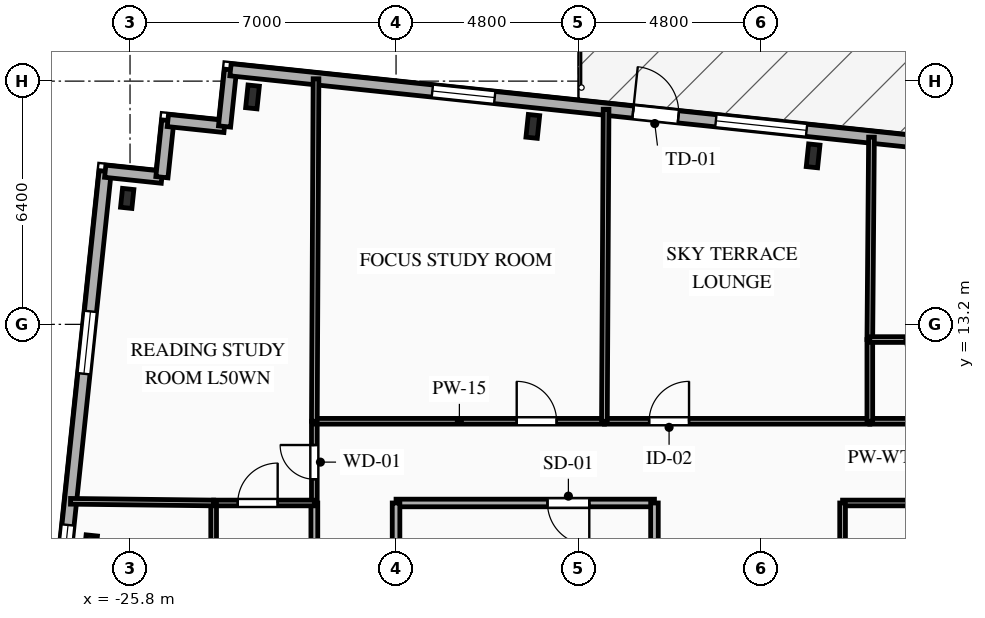
"""IFC4 building model, lengths in metres.
Left out: names, types, materials, properties, quantities, classifications, styles, units other than length and angle.
Written with IfcOpenShell. Run it as: python <this file> out.ifc"""

import sys

from ifc_helpers import new_model, si_unit, direction, frame, frame_2d, origin, origin_2d, place, context, subcontext, project, spatial, rectangle, i_section, extrude, element, fill, save


model = new_model("IFC4")
c1 = context("Model", 3, precision=1e-05, world=origin(), true_north=direction((0.0, 1.0)))
c2 = subcontext(c1, "Body", "Model", "MODEL_VIEW")
j1 = project(units=[si_unit("LENGTHUNIT", "METRE"), si_unit("PLANEANGLEUNIT", "RADIAN")], contexts=[c1])
p1 = place(None, origin())
s1 = spatial("IfcSite", under=j1, at=p1, CompositionType="ELEMENT")
p2 = place(p1, origin())
s2 = spatial("IfcBuilding", under=s1, at=p2, CompositionType="ELEMENT")
p3 = place(p2, frame((0.0, 0.0, 179.65)))
s3 = spatial("IfcBuildingStorey", under=s2, at=p3, CompositionType="ELEMENT", Elevation=179.65)
for number, where, z_axis, x_axis in (
    (1, (-7.825, 17.634, 0.0), (0.0, 0.0, 1.0), (0.995, -0.105, 0.0)),
    (2, (-15.201, 18.409, 0.0), (0.0, 0.0, 1.0), (0.995, -0.105, 0.0)),
    (3, (-22.577, 19.184, 0.0), (0.0, 0.0, 1.0), (0.995, -0.105, 0.0)),
):
    element("IfcColumn", number, at=place(p3, frame(where, z_axis=z_axis, x_axis=x_axis)), inside=s3, PredefinedType="COLUMN", context=c2, shape_type="SweptSolid", body=[
        extrude(i_section(OverallWidth=0.3, OverallDepth=0.6, WebThickness=0.015, FlangeThickness=0.03, FilletRadius=0.027, at=origin_2d()), origin(), (0.0, 0.0, 1.0), 3.35),
    ])
for number, where, z_axis, x_axis in (
    (4, (-25.875, 16.514, 0.0), (0.0, 0.0, 1.0), (0.995, -0.105, 0.0)),
    (5, (-26.833, 7.398, 0.0), (0.0, 0.0, 1.0), (0.995, -0.105, 0.0)),
):
    element("IfcColumn", number, at=place(p3, frame(where, z_axis=z_axis, x_axis=x_axis)), inside=s3, PredefinedType="COLUMN", context=c2, shape_type="SweptSolid", body=[
        extrude(i_section(OverallWidth=0.3, OverallDepth=0.5, WebThickness=0.014, FlangeThickness=0.028, FilletRadius=0.027, at=origin_2d()), origin(), (0.0, 0.0, 1.0), 3.35),
    ])
p4 = place(p3, frame((-29.463, -11.414, 0.0), z_axis=(0.0, 0.0, 1.0), x_axis=(0.104530779244, 0.994521651947, 0.0)))
e6 = element("IfcWall", 6, at=p4, inside=s3, PredefinedType="SOLIDWALL", context=c2, shape_type="SweptSolid", body=[
    extrude(rectangle(XDim=28.8, YDim=0.32, at=frame_2d((14.4, 0.0))), origin(), (0.0, 0.0, 1.0), 3.04),
])
p5 = place(p4, frame((2.384, 0.0, 0.85)))
e7 = element("IfcOpeningElement", 7, at=p5, cuts=e6, PredefinedType="OPENING", context=c2, shape_type="SweptSolid", body=[
    extrude(rectangle(XDim=1.65, YDim=1.85, at=frame_2d((0.825, 0.925))), frame((0.0, 0.17, 0.0), z_axis=(0.0, -1.0, 0.0), x_axis=(1.0, 0.0, 0.0)), (0.0, 0.0, 1.0), 0.34),
])
p6 = place(p4, frame((8.973, 0.0, 0.85)))
e8 = element("IfcOpeningElement", 8, at=p6, cuts=e6, PredefinedType="OPENING", context=c2, shape_type="SweptSolid", body=[
    extrude(rectangle(XDim=1.95, YDim=1.85, at=frame_2d((0.975, 0.925))), frame((0.0, 0.17, 0.0), z_axis=(0.0, -1.0, 0.0), x_axis=(1.0, 0.0, 0.0)), (0.0, 0.0, 1.0), 0.34),
])
p7 = place(p4, frame((12.286, 0.0, 0.85)))
e9 = element("IfcOpeningElement", 9, at=p7, cuts=e6, PredefinedType="OPENING", context=c2, shape_type="SweptSolid", body=[
    extrude(rectangle(XDim=1.5, YDim=1.85, at=frame_2d((0.75, 0.925))), frame((0.0, 0.17, 0.0), z_axis=(0.0, -1.0, 0.0), x_axis=(1.0, 0.0, 0.0)), (0.0, 0.0, 1.0), 0.34),
])
p8 = place(p4, frame((15.094, 0.0, 0.85)))
e10 = element("IfcOpeningElement", 10, at=p8, cuts=e6, PredefinedType="OPENING", context=c2, shape_type="SweptSolid", body=[
    extrude(rectangle(XDim=1.5, YDim=1.85, at=frame_2d((0.75, 0.925))), frame((0.0, 0.17, 0.0), z_axis=(0.0, -1.0, 0.0), x_axis=(1.0, 0.0, 0.0)), (0.0, 0.0, 1.0), 0.34),
])
p9 = place(p4, frame((17.942, 0.0, 0.85)))
e11 = element("IfcOpeningElement", 11, at=p9, cuts=e6, PredefinedType="OPENING", context=c2, shape_type="SweptSolid", body=[
    extrude(rectangle(XDim=1.5, YDim=1.85, at=frame_2d((0.75, 0.925))), frame((0.0, 0.17, 0.0), z_axis=(0.0, -1.0, 0.0), x_axis=(1.0, 0.0, 0.0)), (0.0, 0.0, 1.0), 0.34),
])
p10 = place(p4, frame((23.442, 0.0, 0.85)))
e12 = element("IfcOpeningElement", 12, at=p10, cuts=e6, PredefinedType="OPENING", context=c2, shape_type="SweptSolid", body=[
    extrude(rectangle(XDim=1.65, YDim=1.85, at=frame_2d((0.825, 0.925))), frame((0.0, 0.17, 0.0), z_axis=(0.0, -1.0, 0.0), x_axis=(1.0, 0.0, 0.0)), (0.0, 0.0, 1.0), 0.34),
])
p11 = place(p3, frame((-26.453, 17.229, 0.0), z_axis=(0.0, 0.0, 1.0), x_axis=(0.994508128223, -0.104659366031, 0.0)))
e13 = element("IfcWall", 13, at=p11, inside=s3, PredefinedType="SOLIDWALL", context=c2, shape_type="SweptSolid", body=[
    extrude(rectangle(XDim=1.5, YDim=0.32, at=frame_2d((0.75, 0.0))), origin(), (0.0, 0.0, 1.0), 3.04),
])
p12 = place(p3, frame((-24.961, 17.072, 0.0), z_axis=(0.0, 0.0, 1.0), x_axis=(0.104642427191, 0.994509910675, 0.0)))
e14 = element("IfcWall", 14, at=p12, inside=s3, PredefinedType="SOLIDWALL", context=c2, shape_type="SweptSolid", body=[
    extrude(rectangle(XDim=1.5, YDim=0.32, at=frame_2d((0.75, 0.0))), origin(), (0.0, 0.0, 1.0), 3.04),
])
p13 = place(p3, frame((-24.804, 18.563, 0.0), z_axis=(0.0, 0.0, 1.0), x_axis=(0.994508128223, -0.104659366031, 0.0)))
e15 = element("IfcWall", 15, at=p13, inside=s3, PredefinedType="SOLIDWALL", context=c2, shape_type="SweptSolid", body=[
    extrude(rectangle(XDim=1.5, YDim=0.32, at=frame_2d((0.75, 0.0))), origin(), (0.0, 0.0, 1.0), 3.04),
])
p14 = place(p3, frame((-23.312, 18.406, 0.0), z_axis=(0.0, 0.0, 1.0), x_axis=(0.104481464157, 0.994526834051, 0.0)))
e16 = element("IfcWall", 16, at=p14, inside=s3, PredefinedType="SOLIDWALL", context=c2, shape_type="SweptSolid", body=[
    extrude(rectangle(XDim=1.5, YDim=0.32, at=frame_2d((0.75, 0.0))), origin(), (0.0, 0.0, 1.0), 3.04),
])
p15 = place(p3, frame((-23.156, 19.898, 0.0), z_axis=(0.0, 0.0, 1.0), x_axis=(0.994522001802, -0.104527450613, 0.0)))
e17 = element("IfcWall", 17, at=p15, inside=s3, PredefinedType="SOLIDWALL", context=c2, shape_type="SweptSolid", body=[
    extrude(rectangle(XDim=45.8, YDim=0.32, at=frame_2d((22.9, 0.0))), origin(), (0.0, 0.0, 1.0), 3.04),
])
p16 = place(p15, frame((10.65, 0.0, 0.0)))
e18 = element("IfcOpeningElement", 18, at=p16, cuts=e17, PredefinedType="OPENING", context=c2, shape_type="SweptSolid", body=[
    extrude(rectangle(XDim=1.2, YDim=2.2, at=frame_2d((0.6, 1.1))), frame((0.0, 0.17, 0.0), z_axis=(0.0, -1.0, 0.0), x_axis=(1.0, 0.0, 0.0)), (0.0, 0.0, 1.0), 0.34),
])
p17 = place(p15, frame((5.34, 0.0, 0.85)))
e19 = element("IfcOpeningElement", 19, at=p17, cuts=e17, PredefinedType="OPENING", context=c2, shape_type="SweptSolid", body=[
    extrude(rectangle(XDim=1.65, YDim=1.85, at=frame_2d((0.825, 0.925))), frame((0.0, 0.17, 0.0), z_axis=(0.0, -1.0, 0.0), x_axis=(1.0, 0.0, 0.0)), (0.0, 0.0, 1.0), 0.34),
])
p18 = place(p15, frame((12.842, 0.0, 0.85)))
e20 = element("IfcOpeningElement", 20, at=p18, cuts=e17, PredefinedType="OPENING", context=c2, shape_type="SweptSolid", body=[
    extrude(rectangle(XDim=2.4, YDim=1.95, at=frame_2d((1.2, 0.975))), frame((0.0, 0.17, 0.0), z_axis=(0.0, -1.0, 0.0), x_axis=(1.0, 0.0, 0.0)), (0.0, 0.0, 1.0), 0.34),
])
p19 = place(p15, frame((19.398, 0.0, 0.85)))
e21 = element("IfcOpeningElement", 21, at=p19, cuts=e17, PredefinedType="OPENING", context=c2, shape_type="SweptSolid", body=[
    extrude(rectangle(XDim=2.2, YDim=1.85, at=frame_2d((1.1, 0.925))), frame((0.0, 0.17, 0.0), z_axis=(0.0, -1.0, 0.0), x_axis=(1.0, 0.0, 0.0)), (0.0, 0.0, 1.0), 0.34),
])
p20 = place(p15, frame((26.344, 0.0, 0.85)))
e22 = element("IfcOpeningElement", 22, at=p20, cuts=e17, PredefinedType="OPENING", context=c2, shape_type="SweptSolid", body=[
    extrude(rectangle(XDim=2.4, YDim=1.95, at=frame_2d((1.2, 0.975))), frame((0.0, 0.17, 0.0), z_axis=(0.0, -1.0, 0.0), x_axis=(1.0, 0.0, 0.0)), (0.0, 0.0, 1.0), 0.34),
])
p21 = place(p15, frame((33.49, 0.0, 0.85)))
e23 = element("IfcOpeningElement", 23, at=p21, cuts=e17, PredefinedType="OPENING", context=c2, shape_type="SweptSolid", body=[
    extrude(rectangle(XDim=2.2, YDim=1.85, at=frame_2d((1.1, 0.925))), frame((0.0, 0.17, 0.0), z_axis=(0.0, -1.0, 0.0), x_axis=(1.0, 0.0, 0.0)), (0.0, 0.0, 1.0), 0.34),
])
p22 = place(p15, frame((40.451, 0.0, 0.85)))
e24 = element("IfcOpeningElement", 24, at=p22, cuts=e17, PredefinedType="OPENING", context=c2, shape_type="SweptSolid", body=[
    extrude(rectangle(XDim=1.65, YDim=1.85, at=frame_2d((0.825, 0.925))), frame((0.0, 0.17, 0.0), z_axis=(0.0, -1.0, 0.0), x_axis=(1.0, 0.0, 0.0)), (0.0, 0.0, 1.0), 0.34),
])
p23 = place(p3, frame((-12.0, 8.5, 0.0), z_axis=(0.0, 0.0, 1.0), x_axis=(-1.0, 0.0, 0.0)))
e25 = element("IfcWall", 25, at=p23, inside=s3, PredefinedType="PARTITIONING", context=c2, shape_type="SweptSolid", body=[
    extrude(rectangle(XDim=6.8, YDim=0.2, at=frame_2d((3.4, 0.0))), origin(), (0.0, 0.0, 1.0), 3.04),
])
p24 = place(p23, frame((1.715, 0.0, 0.0)))
e26 = element("IfcOpeningElement", 26, at=p24, cuts=e25, PredefinedType="OPENING", context=c2, shape_type="SweptSolid", body=[
    extrude(rectangle(XDim=1.1, YDim=2.15, at=frame_2d((0.55, 1.075))), frame((0.0, 0.11, 0.0), z_axis=(0.0, -1.0, 0.0), x_axis=(1.0, 0.0, 0.0)), (0.0, 0.0, 1.0), 0.22),
])
p25 = place(p3, frame((-18.8, 8.5, 0.0), z_axis=(0.0, 0.0, 1.0), x_axis=(0.0, -1.0, 0.0)))
e27 = element("IfcWall", 27, at=p25, inside=s3, PredefinedType="PARTITIONING", context=c2, shape_type="SweptSolid", body=[
    extrude(rectangle(XDim=2.9, YDim=0.2, at=frame_2d((1.45, 0.0))), origin(), (0.0, 0.0, 1.0), 2.665),
])
p26 = place(p3, frame((-12.0, 5.6, 0.0), z_axis=(0.0, 0.0, 1.0), x_axis=(0.0, 1.0, 0.0)))
e28 = element("IfcWall", 28, at=p26, inside=s3, PredefinedType="PARTITIONING", context=c2, shape_type="SweptSolid", body=[
    extrude(rectangle(XDim=2.9, YDim=0.2, at=frame_2d((1.45, 0.0))), origin(), (0.0, 0.0, 1.0), 3.04),
])
p27 = place(p3, frame((-20.95, 8.5, 0.0), z_axis=(0.0, 0.0, 1.0), x_axis=(0.0, 1.0, 0.0)))
e29 = element("IfcWall", 29, at=p27, inside=s3, PredefinedType="PARTITIONING", context=c2, shape_type="SweptSolid", body=[
    extrude(rectangle(XDim=2.15, YDim=0.15, at=frame_2d((1.075, 0.0))), origin(), (0.0, 0.0, 1.0), 3.04),
])
p28 = place(p27, frame((0.625, 0.0, 0.0)))
e30 = element("IfcOpeningElement", 30, at=p28, cuts=e29, PredefinedType="OPENING", context=c2, shape_type="SweptSolid", body=[
    extrude(rectangle(XDim=0.9, YDim=2.1, at=frame_2d((0.45, 1.05))), frame((0.0, 0.085, 0.0), z_axis=(0.0, -1.0, 0.0), x_axis=(1.0, 0.0, 0.0)), (0.0, 0.0, 1.0), 0.17),
])
p29 = place(p3, frame((-20.95, 10.65, 0.0), z_axis=(0.0, 0.0, 1.0), x_axis=(1.0, 0.0, 0.0)))
e31 = element("IfcWall", 31, at=p29, inside=s3, PredefinedType="PARTITIONING", context=c2, shape_type="SweptSolid", body=[
    extrude(rectangle(XDim=7.633, YDim=0.15, at=frame_2d((3.816, 0.0))), origin(), (0.0, 0.0, 1.0), 3.04),
])
p30 = place(p29, frame((5.325, 0.0, 0.0)))
e32 = element("IfcOpeningElement", 32, at=p30, cuts=e31, PredefinedType="OPENING", context=c2, shape_type="SweptSolid", body=[
    extrude(rectangle(XDim=1.05, YDim=2.15, at=frame_2d((0.525, 1.075))), frame((0.0, 0.085, 0.0), z_axis=(0.0, -1.0, 0.0), x_axis=(1.0, 0.0, 0.0)), (0.0, 0.0, 1.0), 0.17),
])
p31 = place(p3, frame((-13.317, 10.65, 0.0), z_axis=(0.0, 0.0, 1.0), x_axis=(1.0, 0.0, 0.0)))
e33 = element("IfcWall", 33, at=p31, inside=s3, PredefinedType="PARTITIONING", context=c2, shape_type="SweptSolid", body=[
    extrude(rectangle(XDim=6.984, YDim=0.15, at=frame_2d((3.492, 0.0))), origin(), (0.0, 0.0, 1.0), 3.04),
])
p32 = place(p31, frame((1.177, 0.0, 0.0)))
e34 = element("IfcOpeningElement", 34, at=p32, cuts=e33, PredefinedType="OPENING", context=c2, shape_type="SweptSolid", body=[
    extrude(rectangle(XDim=1.05, YDim=2.15, at=frame_2d((0.525, 1.075))), frame((0.0, 0.085, 0.0), z_axis=(0.0, -1.0, 0.0), x_axis=(1.0, 0.0, 0.0)), (0.0, 0.0, 1.0), 0.17),
])
p33 = place(p3, frame((-6.333, 10.65, 0.0), z_axis=(0.0, 0.0, 1.0), x_axis=(1.0, 0.0, 0.0)))
e35 = element("IfcWall", 35, at=p33, inside=s3, PredefinedType="PLUMBINGWALL", context=c2, shape_type="SweptSolid", body=[
    extrude(rectangle(XDim=2.45, YDim=0.15, at=frame_2d((1.225, 0.0))), origin(), (0.0, 0.0, 1.0), 3.04),
])
p34 = place(p3, frame((0.0, 8.5, 0.0), z_axis=(0.0, 0.0, 1.0), x_axis=(-1.0, 0.0, 0.0)))
e36 = element("IfcWall", 36, at=p34, inside=s3, PredefinedType="PARTITIONING", context=c2, shape_type="SweptSolid", body=[
    extrude(rectangle(XDim=7.05, YDim=0.15, at=frame_2d((3.525, 0.0))), origin(), (0.0, 0.0, 1.0), 3.04),
])
p35 = place(p3, frame((-20.95, -5.6, 0.0), z_axis=(0.0, 0.0, 1.0), x_axis=(0.0, 1.0, 0.0)))
e37 = element("IfcWall", 37, at=p35, inside=s3, PredefinedType="PARTITIONING", context=c2, shape_type="SweptSolid", body=[
    extrude(rectangle(XDim=14.1, YDim=0.18, at=frame_2d((7.05, 0.0))), origin(), (0.0, 0.0, 1.0), 3.04),
])
p36 = place(p35, frame((5.058, 0.0, 0.0)))
e38 = element("IfcOpeningElement", 38, at=p36, cuts=e37, PredefinedType="OPENING", context=c2, shape_type="SweptSolid", body=[
    extrude(rectangle(XDim=1.0, YDim=2.15, at=frame_2d((0.5, 1.075))), frame((0.0, 0.1, 0.0), z_axis=(0.0, -1.0, 0.0), x_axis=(1.0, 0.0, 0.0)), (0.0, 0.0, 1.0), 0.2),
])
p37 = place(p3, frame((-7.05, 8.5, 0.0), z_axis=(0.0, 0.0, 1.0), x_axis=(0.0, -1.0, 0.0)))
e39 = element("IfcWall", 39, at=p37, inside=s3, PredefinedType="PARTITIONING", context=c2, shape_type="SweptSolid", body=[
    extrude(rectangle(XDim=9.3, YDim=0.15, at=frame_2d((4.65, 0.0))), origin(), (0.0, 0.0, 1.0), 3.04),
])
p38 = place(p37, frame((6.784, 0.0, 0.0)))
e40 = element("IfcOpeningElement", 40, at=p38, cuts=e39, PredefinedType="OPENING", context=c2, shape_type="SweptSolid", body=[
    extrude(rectangle(XDim=1.05, YDim=2.15, at=frame_2d((0.525, 1.075))), frame((0.0, 0.085, 0.0), z_axis=(0.0, -1.0, 0.0), x_axis=(1.0, 0.0, 0.0)), (0.0, 0.0, 1.0), 0.17),
])
p39 = place(p3, frame((-23.6, 8.5, 0.0), z_axis=(0.0, 0.0, 1.0), x_axis=(1.0, 0.0, 0.0)))
e41 = element("IfcWall", 41, at=p39, inside=s3, PredefinedType="PARTITIONING", context=c2, shape_type="SweptSolid", body=[
    extrude(rectangle(XDim=2.65, YDim=0.15, at=frame_2d((1.325, 0.0))), origin(), (0.0, 0.0, 1.0), 3.04),
])
p40 = place(p39, frame((0.635, 0.0, 0.0)))
e42 = element("IfcOpeningElement", 42, at=p40, cuts=e41, PredefinedType="OPENING", context=c2, shape_type="SweptSolid", body=[
    extrude(rectangle(XDim=1.05, YDim=2.15, at=frame_2d((0.525, 1.075))), frame((0.0, 0.085, 0.0), z_axis=(0.0, -1.0, 0.0), x_axis=(1.0, 0.0, 0.0)), (0.0, 0.0, 1.0), 0.17),
])
p41 = place(p3, frame((-23.6, 5.68, 0.0), z_axis=(0.0, 0.0, 1.0), x_axis=(0.0, 1.0, 0.0)))
e43 = element("IfcWall", 43, at=p41, inside=s3, PredefinedType="PARTITIONING", context=c2, shape_type="SweptSolid", body=[
    extrude(rectangle(XDim=2.82, YDim=0.15, at=frame_2d((1.41, 0.0))), origin(), (0.0, 0.0, 1.0), 3.04),
])
p42 = place(p41, frame((0.669, 0.0, 0.0)))
e44 = element("IfcOpeningElement", 44, at=p42, cuts=e43, PredefinedType="OPENING", context=c2, shape_type="SweptSolid", body=[
    extrude(rectangle(XDim=0.95, YDim=2.1, at=frame_2d((0.475, 1.05))), frame((0.0, 0.085, 0.0), z_axis=(0.0, -1.0, 0.0), x_axis=(1.0, 0.0, 0.0)), (0.0, 0.0, 1.0), 0.17),
])
p43 = place(p3, frame((-23.6, 8.5, 0.0), z_axis=(0.0, 0.0, 1.0), x_axis=(-0.999931911052, 0.011669329875, 0.0)))
e45 = element("IfcWall", 45, at=p43, inside=s3, PredefinedType="PARTITIONING", context=c2, shape_type="SweptSolid", body=[
    extrude(rectangle(XDim=3.766, YDim=0.15, at=frame_2d((1.883, 0.0))), origin(), (0.0, 0.0, 1.0), 3.04),
])
p44 = place(p3, frame((-20.906, 19.662, 0.0), z_axis=(0.0, 0.0, 1.0), x_axis=(-0.004876272857, -0.999988110911, 0.0)))
e46 = element("IfcWall", 46, at=p44, inside=s3, PredefinedType="PARTITIONING", context=c2, shape_type="SweptSolid", body=[
    extrude(rectangle(XDim=9.012, YDim=0.15, at=frame_2d((4.506, 0.0))), origin(), (0.0, 0.0, 1.0), 2.665),
])
p45 = place(p3, frame((-13.273, 18.86, 0.0), z_axis=(0.0, 0.0, 1.0), x_axis=(-0.005323028044, -0.999985832586, 0.0)))
e47 = element("IfcWall", 47, at=p45, inside=s3, PredefinedType="PARTITIONING", context=c2, shape_type="SweptSolid", body=[
    extrude(rectangle(XDim=8.21, YDim=0.15, at=frame_2d((4.105, 0.0))), origin(), (0.0, 0.0, 1.0), 3.04),
])
p46 = place(p3, frame((-6.289, 18.125, 0.0), z_axis=(0.0, 0.0, 1.0), x_axis=(-0.008251678897, -0.999965954318, 0.0)))
e48 = element("IfcWall", 48, at=p46, inside=s3, PredefinedType="PARTITIONING", context=c2, shape_type="SweptSolid", body=[
    extrude(rectangle(XDim=5.326, YDim=0.15, at=frame_2d((2.663, 0.0))), origin(), (0.0, 0.0, 1.0), 3.04),
])
p47 = place(p3, frame((-6.333, 12.8, 0.0), z_axis=(0.0, 0.0, 1.0), x_axis=(0.0, -1.0, 0.0)))
e49 = element("IfcWall", 49, at=p47, inside=s3, PredefinedType="PLUMBINGWALL", context=c2, shape_type="SweptSolid", body=[
    extrude(rectangle(XDim=2.15, YDim=0.15, at=frame_2d((1.075, 0.0))), origin(), (0.0, 0.0, 1.0), 3.04),
])
p48 = place(p3, frame((-3.883, 12.8, 0.0), z_axis=(0.0, 0.0, 1.0), x_axis=(-1.0, 0.0, 0.0)))
e50 = element("IfcWall", 50, at=p48, inside=s3, PredefinedType="PLUMBINGWALL", context=c2, shape_type="SweptSolid", body=[
    extrude(rectangle(XDim=2.45, YDim=0.15, at=frame_2d((1.225, 0.0))), origin(), (0.0, 0.0, 1.0), 3.04),
])
p49 = place(p48, frame((0.629, 0.0, 0.0)))
e51 = element("IfcOpeningElement", 51, at=p49, cuts=e50, PredefinedType="OPENING", context=c2, shape_type="SweptSolid", body=[
    extrude(rectangle(XDim=0.9, YDim=2.1, at=frame_2d((0.45, 1.05))), frame((0.0, 0.085, 0.0), z_axis=(0.0, -1.0, 0.0), x_axis=(1.0, 0.0, 0.0)), (0.0, 0.0, 1.0), 0.17),
])
p50 = place(p9, origin())
e52 = element("IfcWindow", 52, at=p50, inside=s3, PartitioningType="SINGLE_PANEL", PredefinedType="WINDOW", context=c2, shape_type="SweptSolid", body=[
    extrude(rectangle(XDim=1.5, YDim=1.85, at=frame_2d((0.75, 0.925))), frame((0.0, 0.03, 0.0), z_axis=(0.0, -1.0, 0.0), x_axis=(1.0, 0.0, 0.0)), (0.0, 0.0, 1.0), 0.06),
])
fill(e11, e52)
p51 = place(p10, origin())
e53 = element("IfcWindow", 53, at=p51, inside=s3, PartitioningType="SINGLE_PANEL", PredefinedType="WINDOW", context=c2, shape_type="SweptSolid", body=[
    extrude(rectangle(XDim=1.65, YDim=1.85, at=frame_2d((0.825, 0.925))), frame((0.0, 0.03, 0.0), z_axis=(0.0, -1.0, 0.0), x_axis=(1.0, 0.0, 0.0)), (0.0, 0.0, 1.0), 0.06),
])
fill(e12, e53)
p52 = place(p16, origin())
e54 = element("IfcDoor", 54, at=p52, inside=s3, OperationType="SINGLE_SWING_LEFT", PredefinedType="DOOR", context=c2, shape_type="SweptSolid", body=[
    extrude(rectangle(XDim=1.2, YDim=2.2, at=frame_2d((0.6, 1.1))), frame((0.0, 0.025, 0.0), z_axis=(0.0, -1.0, 0.0), x_axis=(1.0, 0.0, 0.0)), (0.0, 0.0, 1.0), 0.05),
])
fill(e18, e54)
p53 = place(p17, origin())
e55 = element("IfcWindow", 55, at=p53, inside=s3, PartitioningType="SINGLE_PANEL", PredefinedType="WINDOW", context=c2, shape_type="SweptSolid", body=[
    extrude(rectangle(XDim=1.65, YDim=1.85, at=frame_2d((0.825, 0.925))), frame((0.0, 0.03, 0.0), z_axis=(0.0, -1.0, 0.0), x_axis=(1.0, 0.0, 0.0)), (0.0, 0.0, 1.0), 0.06),
])
fill(e19, e55)
p54 = place(p18, origin())
e56 = element("IfcWindow", 56, at=p54, inside=s3, PartitioningType="SINGLE_PANEL", PredefinedType="WINDOW", context=c2, shape_type="SweptSolid", body=[
    extrude(rectangle(XDim=2.4, YDim=1.95, at=frame_2d((1.2, 0.975))), frame((0.0, 0.03, 0.0), z_axis=(0.0, -1.0, 0.0), x_axis=(1.0, 0.0, 0.0)), (0.0, 0.0, 1.0), 0.06),
])
fill(e20, e56)
p55 = place(p24, origin())
e57 = element("IfcDoor", 57, at=p55, inside=s3, OperationType="SINGLE_SWING_LEFT", PredefinedType="DOOR", context=c2, shape_type="SweptSolid", body=[
    extrude(rectangle(XDim=1.1, YDim=2.15, at=frame_2d((0.55, 1.075))), frame((0.0, 0.025, 0.0), z_axis=(0.0, -1.0, 0.0), x_axis=(1.0, 0.0, 0.0)), (0.0, 0.0, 1.0), 0.05),
])
fill(e26, e57)
p56 = place(p28, origin())
e58 = element("IfcDoor", 58, at=p56, inside=s3, OperationType="SINGLE_SWING_RIGHT", PredefinedType="DOOR", context=c2, shape_type="SweptSolid", body=[
    extrude(rectangle(XDim=0.9, YDim=2.1, at=frame_2d((0.45, 1.05))), frame((0.0, 0.025, 0.0), z_axis=(0.0, -1.0, 0.0), x_axis=(1.0, 0.0, 0.0)), (0.0, 0.0, 1.0), 0.05),
])
fill(e30, e58)
p57 = place(p30, origin())
e59 = element("IfcDoor", 59, at=p57, inside=s3, OperationType="SINGLE_SWING_LEFT", PredefinedType="DOOR", context=c2, shape_type="SweptSolid", body=[
    extrude(rectangle(XDim=1.05, YDim=2.15, at=frame_2d((0.525, 1.075))), frame((0.0, 0.025, 0.0), z_axis=(0.0, -1.0, 0.0), x_axis=(1.0, 0.0, 0.0)), (0.0, 0.0, 1.0), 0.05),
])
fill(e32, e59)
p58 = place(p32, origin())
e60 = element("IfcDoor", 60, at=p58, inside=s3, OperationType="SINGLE_SWING_RIGHT", PredefinedType="DOOR", context=c2, shape_type="SweptSolid", body=[
    extrude(rectangle(XDim=1.05, YDim=2.15, at=frame_2d((0.525, 1.075))), frame((0.0, 0.025, 0.0), z_axis=(0.0, -1.0, 0.0), x_axis=(1.0, 0.0, 0.0)), (0.0, 0.0, 1.0), 0.05),
])
fill(e34, e60)
p59 = place(p40, origin())
e61 = element("IfcDoor", 61, at=p59, inside=s3, OperationType="SINGLE_SWING_RIGHT", PredefinedType="DOOR", context=c2, shape_type="SweptSolid", body=[
    extrude(rectangle(XDim=1.05, YDim=2.15, at=frame_2d((0.525, 1.075))), frame((0.0, 0.025, 0.0), z_axis=(0.0, -1.0, 0.0), x_axis=(1.0, 0.0, 0.0)), (0.0, 0.0, 1.0), 0.05),
])
fill(e42, e61)
p60 = place(p49, origin())
e62 = element("IfcDoor", 62, at=p60, inside=s3, OperationType="SINGLE_SWING_LEFT", PredefinedType="DOOR", context=c2, shape_type="SweptSolid", body=[
    extrude(rectangle(XDim=0.9, YDim=2.1, at=frame_2d((0.45, 1.05))), frame((0.0, 0.025, 0.0), z_axis=(0.0, -1.0, 0.0), x_axis=(1.0, 0.0, 0.0)), (0.0, 0.0, 1.0), 0.05),
])
fill(e51, e62)
save(model, sys.argv[1])
